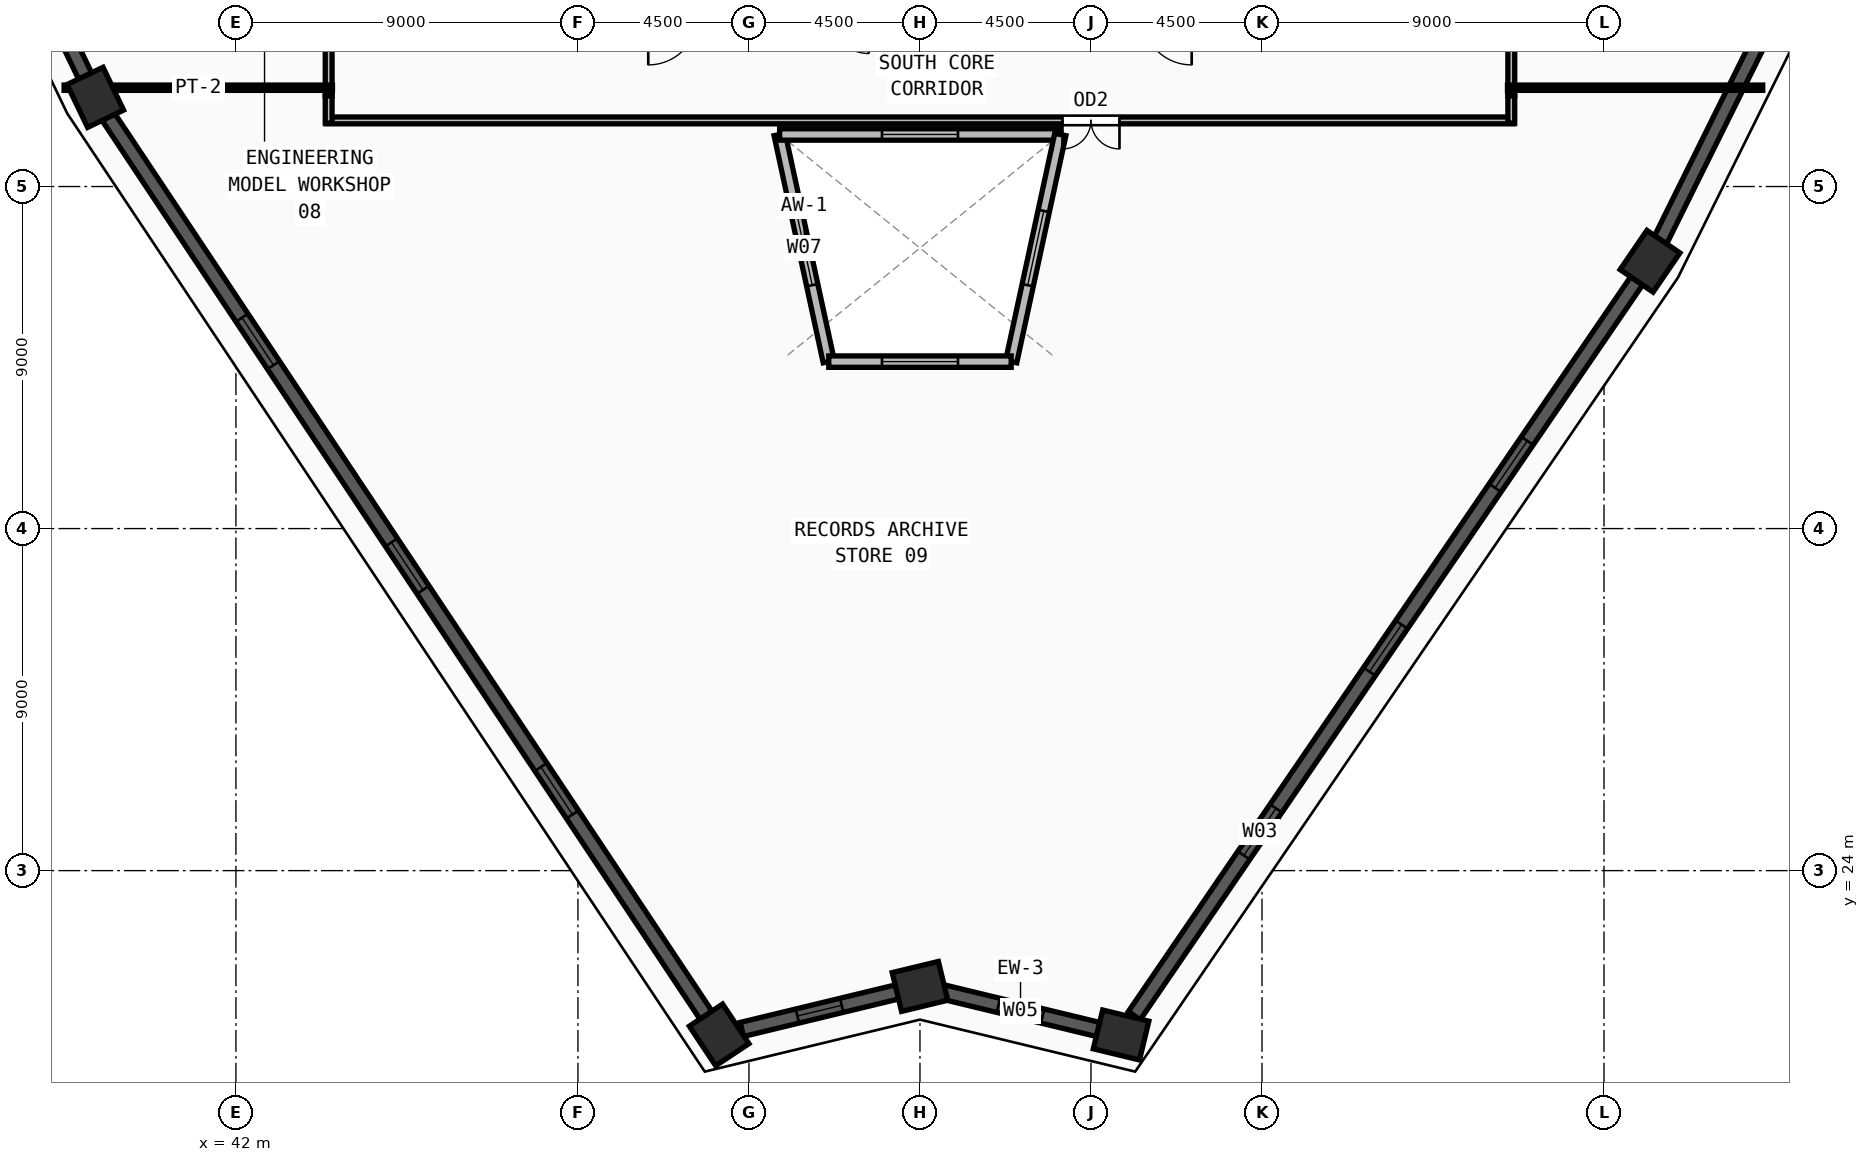
"""IFC4 building model, lengths in metres.
Left out: names, types, materials, properties, quantities, classifications, styles, units other than length and angle.
Written with IfcOpenShell. Run it as: python <this file> out.ifc"""

import sys

from ifc_helpers import new_model, si_unit, direction, frame, frame_2d, origin, origin_2d, place, context, subcontext, project, spatial, rectangle, extrude, source, transform, mapped, element, fill, save


model = new_model("IFC4")
c1 = context("Model", 3, precision=1e-05, world=origin(), true_north=direction((0.0, 1.0)))
c2 = subcontext(c1, "Body", "Model", "MODEL_VIEW")
j1 = project(units=[si_unit("LENGTHUNIT", "METRE"), si_unit("PLANEANGLEUNIT", "RADIAN")], contexts=[c1])
p1 = place(None, origin())
s1 = spatial("IfcSite", under=j1, at=p1, CompositionType="ELEMENT")
p2 = place(p1, origin())
s2 = spatial("IfcBuilding", under=s1, at=p2, CompositionType="ELEMENT")
p3 = place(p2, frame((0.0, 0.0, 236.25)))
s3 = spatial("IfcBuildingStorey", under=s2, at=p3, CompositionType="ELEMENT", Elevation=236.25)
m1 = source(origin(), c2, "Body", "SweptSolid", [
    extrude(rectangle(XDim=1.25, YDim=1.05, at=origin_2d()), origin(), (0.0, 0.0, 1.0), 3.75),
])
for number, where, z_axis, x_axis in (
    (1, (54.715, 19.677, 0.0), (0.0, 0.0, 1.0), (-0.554, 0.833, 0.0)),
    (2, (38.3, 44.347, 0.0), (0.0, 0.0, 1.0), (-0.433, 0.902, 0.0)),
    (3, (79.21, 40.034, 0.0), (0.0, 0.0, 1.0), (0.564, 0.826, 0.0)),
    (4, (65.292, 19.675, 0.0), (0.0, 0.0, 1.0), (-0.972, 0.235, 0.0)),
    (5, (60.0, 20.953, 0.0), (0.0, 0.0, 1.0), (0.972, 0.235, 0.0)),
):
    element("IfcColumn", number, at=place(p3, frame(where, z_axis=z_axis, x_axis=x_axis)), inside=s3, PredefinedType="COLUMN", context=c2, shape_type="MappedRepresentation", body=[
        mapped(m1, transform((0.0, 0.0, 0.0), x_axis=(1.0, 0.0, 0.0), y_axis=(0.0, 1.0, 0.0), z_axis=(0.0, 0.0, 1.0), scale=1.0)),
    ])
p4 = place(p3, frame((60.598, 20.809, 0.0), z_axis=(0.0, 0.0, 1.0), x_axis=(0.972014274606, -0.234921795418, 0.0)))
e6 = element("IfcWall", 6, at=p4, inside=s3, PredefinedType="SOLIDWALL", context=c2, shape_type="SweptSolid", body=[
    extrude(rectangle(XDim=4.214, YDim=0.38, at=frame_2d((2.107, 0.0))), origin(), (0.0, 0.0, 1.0), 3.57),
])
m2 = source(origin(), c2, "Body", "SweptSolid", [
    extrude(rectangle(XDim=1.2, YDim=1.9, at=frame_2d((0.6, 0.95))), frame((0.0, 0.2, 0.0), z_axis=(0.0, -1.0, 0.0), x_axis=(1.0, 0.0, 0.0)), (0.0, 0.0, 1.0), 0.4),
])
p5 = place(p4, frame((1.507, 0.0, 0.55)))
e7 = element("IfcOpeningElement", 7, at=p5, cuts=e6, PredefinedType="OPENING", context=c2, shape_type="MappedRepresentation", body=[
    mapped(m2, transform((0.0, 0.0, 0.0), x_axis=(1.0, 0.0, 0.0), y_axis=(0.0, 1.0, 0.0), z_axis=(0.0, 0.0, 1.0), scale=1.0)),
])
p6 = place(p3, frame((65.639, 20.183, 0.0), z_axis=(0.0, 0.0, 1.0), x_axis=(0.564381319664, 0.825514219147, 0.0)))
e8 = element("IfcWall", 8, at=p6, inside=s3, PredefinedType="SOLIDWALL", context=c2, shape_type="SweptSolid", body=[
    extrude(rectangle(XDim=23.431, YDim=0.38, at=frame_2d((11.716, 0.0))), origin(), (0.0, 0.0, 1.0), 3.57),
])
m3 = source(origin(), c2, "Body", "SweptSolid", [
    extrude(rectangle(XDim=1.5, YDim=1.9, at=frame_2d((0.75, 0.95))), frame((0.0, 0.2, 0.0), z_axis=(0.0, -1.0, 0.0), x_axis=(1.0, 0.0, 0.0)), (0.0, 0.0, 1.0), 0.4),
])
p7 = place(p6, frame((5.108, 0.0, 0.55)))
e9 = element("IfcOpeningElement", 9, at=p7, cuts=e8, PredefinedType="OPENING", context=c2, shape_type="MappedRepresentation", body=[
    mapped(m3, transform((0.0, 0.0, 0.0), x_axis=(1.0, 0.0, 0.0), y_axis=(0.0, 1.0, 0.0), z_axis=(0.0, 0.0, 1.0), scale=1.0)),
])
p8 = place(p6, frame((10.966, 0.0, 0.55)))
e10 = element("IfcOpeningElement", 10, at=p8, cuts=e8, PredefinedType="OPENING", context=c2, shape_type="MappedRepresentation", body=[
    mapped(m3, transform((0.0, 0.0, 0.0), x_axis=(1.0, 0.0, 0.0), y_axis=(0.0, 1.0, 0.0), z_axis=(0.0, 0.0, 1.0), scale=1.0)),
])
p9 = place(p6, frame((16.823, 0.0, 0.55)))
e11 = element("IfcOpeningElement", 11, at=p9, cuts=e8, PredefinedType="OPENING", context=c2, shape_type="MappedRepresentation", body=[
    mapped(m3, transform((0.0, 0.0, 0.0), x_axis=(1.0, 0.0, 0.0), y_axis=(0.0, 1.0, 0.0), z_axis=(0.0, 0.0, 1.0), scale=1.0)),
])
p10 = place(p3, frame((79.483, 40.585, 0.0), z_axis=(0.0, 0.0, 1.0), x_axis=(0.444016540866, 0.896018588779, 0.0)))
e12 = element("IfcWall", 12, at=p10, inside=s3, PredefinedType="SOLIDWALL", context=c2, shape_type="SweptSolid", body=[
    extrude(rectangle(XDim=28.402, YDim=0.38, at=frame_2d((14.201, 0.0))), origin(), (0.0, 0.0, 1.0), 3.57),
])
p11 = place(p10, frame((6.351, 0.0, 0.55)))
e13 = element("IfcOpeningElement", 13, at=p11, cuts=e12, PredefinedType="OPENING", context=c2, shape_type="MappedRepresentation", body=[
    mapped(m3, transform((0.0, 0.0, 0.0), x_axis=(1.0, 0.0, 0.0), y_axis=(0.0, 1.0, 0.0), z_axis=(0.0, 0.0, 1.0), scale=1.0)),
])
p12 = place(p10, frame((13.451, 0.0, 0.55)))
e14 = element("IfcOpeningElement", 14, at=p12, cuts=e12, PredefinedType="OPENING", context=c2, shape_type="MappedRepresentation", body=[
    mapped(m3, transform((0.0, 0.0, 0.0), x_axis=(1.0, 0.0, 0.0), y_axis=(0.0, 1.0, 0.0), z_axis=(0.0, 0.0, 1.0), scale=1.0)),
])
p13 = place(p10, frame((19.702, 0.0, 0.55)))
e15 = element("IfcOpeningElement", 15, at=p13, cuts=e12, PredefinedType="OPENING", context=c2, shape_type="MappedRepresentation", body=[
    mapped(m3, transform((0.0, 0.0, 0.0), x_axis=(1.0, 0.0, 0.0), y_axis=(0.0, 1.0, 0.0), z_axis=(0.0, 0.0, 1.0), scale=1.0)),
])
p14 = place(p3, frame((27.893, 66.025, 0.0), z_axis=(0.0, 0.0, 1.0), x_axis=(0.432777471902, -0.901500781926, 0.0)))
e16 = element("IfcWall", 16, at=p14, inside=s3, PredefinedType="SOLIDWALL", context=c2, shape_type="SweptSolid", body=[
    extrude(rectangle(XDim=23.432, YDim=0.38, at=frame_2d((11.716, 0.0))), origin(), (0.0, 0.0, 1.0), 3.57),
])
p15 = place(p14, frame((5.108, 0.0, 0.55)))
e17 = element("IfcOpeningElement", 17, at=p15, cuts=e16, PredefinedType="OPENING", context=c2, shape_type="MappedRepresentation", body=[
    mapped(m3, transform((0.0, 0.0, 0.0), x_axis=(1.0, 0.0, 0.0), y_axis=(0.0, 1.0, 0.0), z_axis=(0.0, 0.0, 1.0), scale=1.0)),
])
p16 = place(p14, frame((10.966, 0.0, 0.55)))
e18 = element("IfcOpeningElement", 18, at=p16, cuts=e16, PredefinedType="OPENING", context=c2, shape_type="MappedRepresentation", body=[
    mapped(m3, transform((0.0, 0.0, 0.0), x_axis=(1.0, 0.0, 0.0), y_axis=(0.0, 1.0, 0.0), z_axis=(0.0, 0.0, 1.0), scale=1.0)),
])
p17 = place(p3, frame((38.641, 43.835, 0.0), z_axis=(0.0, 0.0, 1.0), x_axis=(0.553942197413, -0.83255512846, 0.0)))
e19 = element("IfcWall", 19, at=p17, inside=s3, PredefinedType="SOLIDWALL", context=c2, shape_type="SweptSolid", body=[
    extrude(rectangle(XDim=28.402, YDim=0.38, at=frame_2d((14.201, 0.0))), origin(), (0.0, 0.0, 1.0), 3.57),
])
p18 = place(p17, frame((6.35, 0.0, 0.55)))
e20 = element("IfcOpeningElement", 20, at=p18, cuts=e19, PredefinedType="OPENING", context=c2, shape_type="MappedRepresentation", body=[
    mapped(m3, transform((0.0, 0.0, 0.0), x_axis=(1.0, 0.0, 0.0), y_axis=(0.0, 1.0, 0.0), z_axis=(0.0, 0.0, 1.0), scale=1.0)),
])
p19 = place(p17, frame((13.451, 0.0, 0.55)))
e21 = element("IfcOpeningElement", 21, at=p19, cuts=e19, PredefinedType="OPENING", context=c2, shape_type="MappedRepresentation", body=[
    mapped(m3, transform((0.0, 0.0, 0.0), x_axis=(1.0, 0.0, 0.0), y_axis=(0.0, 1.0, 0.0), z_axis=(0.0, 0.0, 1.0), scale=1.0)),
])
p20 = place(p17, frame((20.551, 0.0, 0.55)))
e22 = element("IfcOpeningElement", 22, at=p20, cuts=e19, PredefinedType="OPENING", context=c2, shape_type="MappedRepresentation", body=[
    mapped(m3, transform((0.0, 0.0, 0.0), x_axis=(1.0, 0.0, 0.0), y_axis=(0.0, 1.0, 0.0), z_axis=(0.0, 0.0, 1.0), scale=1.0)),
])
p21 = place(p3, frame((55.313, 19.821, 0.0), z_axis=(0.0, 0.0, 1.0), x_axis=(0.972027407526, 0.234867449893, 0.0)))
e23 = element("IfcWall", 23, at=p21, inside=s3, PredefinedType="SOLIDWALL", context=c2, shape_type="SweptSolid", body=[
    extrude(rectangle(XDim=4.207, YDim=0.38, at=frame_2d((2.104, 0.0))), origin(), (0.0, 0.0, 1.0), 3.57),
])
p22 = place(p21, frame((1.503, 0.0, 0.55)))
e24 = element("IfcOpeningElement", 24, at=p22, cuts=e23, PredefinedType="OPENING", context=c2, shape_type="MappedRepresentation", body=[
    mapped(m2, transform((0.0, 0.0, 0.0), x_axis=(1.0, 0.0, 0.0), y_axis=(0.0, 1.0, 0.0), z_axis=(0.0, 0.0, 1.0), scale=1.0)),
])
p23 = place(p3, frame((57.6, 37.393, 0.0), z_axis=(0.0, 0.0, 1.0), x_axis=(-0.211469886749, 0.977384513382, 0.0)))
e25 = element("IfcWall", 25, at=p23, inside=s3, PredefinedType="SOLIDWALL", context=c2, shape_type="SweptSolid", body=[
    extrude(rectangle(XDim=6.115, YDim=0.3, at=frame_2d((3.058, 0.0))), origin(), (0.0, 0.0, 1.0), 3.57),
])
m4 = source(origin(), c2, "Body", "SweptSolid", [
    extrude(rectangle(XDim=2.0, YDim=1.9, at=frame_2d((1.0, 0.95))), frame((0.0, 0.16, 0.0), z_axis=(0.0, -1.0, 0.0), x_axis=(1.0, 0.0, 0.0)), (0.0, 0.0, 1.0), 0.32),
])
p24 = place(p23, frame((2.058, 0.0, 0.55)))
e26 = element("IfcOpeningElement", 26, at=p24, cuts=e25, PredefinedType="OPENING", context=c2, shape_type="MappedRepresentation", body=[
    mapped(m4, transform((0.0, 0.0, 0.0), x_axis=(1.0, 0.0, 0.0), y_axis=(0.0, 1.0, 0.0), z_axis=(0.0, 0.0, 1.0), scale=1.0)),
])
p25 = place(p3, frame((56.307, 43.37, 0.0), z_axis=(0.0, 0.0, 1.0), x_axis=(1.0, 0.0, 0.0)))
e27 = element("IfcWall", 27, at=p25, inside=s3, PredefinedType="SOLIDWALL", context=c2, shape_type="SweptSolid", body=[
    extrude(rectangle(XDim=7.386, YDim=0.3, at=frame_2d((3.693, 0.0))), origin(), (0.0, 0.0, 1.0), 3.57),
])
p26 = place(p25, frame((2.693, 0.0, 0.55)))
e28 = element("IfcOpeningElement", 28, at=p26, cuts=e27, PredefinedType="OPENING", context=c2, shape_type="MappedRepresentation", body=[
    mapped(m4, transform((0.0, 0.0, 0.0), x_axis=(1.0, 0.0, 0.0), y_axis=(0.0, 1.0, 0.0), z_axis=(0.0, 0.0, 1.0), scale=1.0)),
])
p27 = place(p3, frame((63.693, 43.37, 0.0), z_axis=(0.0, 0.0, 1.0), x_axis=(-0.211469886749, -0.977384513382, 0.0)))
e29 = element("IfcWall", 29, at=p27, inside=s3, PredefinedType="SOLIDWALL", context=c2, shape_type="SweptSolid", body=[
    extrude(rectangle(XDim=6.115, YDim=0.3, at=frame_2d((3.058, 0.0))), origin(), (0.0, 0.0, 1.0), 3.57),
])
p28 = place(p27, frame((2.058, 0.0, 0.55)))
e30 = element("IfcOpeningElement", 30, at=p28, cuts=e29, PredefinedType="OPENING", context=c2, shape_type="MappedRepresentation", body=[
    mapped(m4, transform((0.0, 0.0, 0.0), x_axis=(1.0, 0.0, 0.0), y_axis=(0.0, 1.0, 0.0), z_axis=(0.0, 0.0, 1.0), scale=1.0)),
])
p29 = place(p3, frame((62.4, 37.393, 0.0), z_axis=(0.0, 0.0, 1.0), x_axis=(-1.0, 0.0, 0.0)))
e31 = element("IfcWall", 31, at=p29, inside=s3, PredefinedType="SOLIDWALL", context=c2, shape_type="SweptSolid", body=[
    extrude(rectangle(XDim=4.8, YDim=0.3, at=frame_2d((2.4, 0.0))), origin(), (0.0, 0.0, 1.0), 3.57),
])
p30 = place(p29, frame((1.4, 0.0, 0.55)))
e32 = element("IfcOpeningElement", 32, at=p30, cuts=e31, PredefinedType="OPENING", context=c2, shape_type="MappedRepresentation", body=[
    mapped(m4, transform((0.0, 0.0, 0.0), x_axis=(1.0, 0.0, 0.0), y_axis=(0.0, 1.0, 0.0), z_axis=(0.0, 0.0, 1.0), scale=1.0)),
])
p31 = place(p3, frame((75.63, 43.74, 0.0), z_axis=(0.0, 0.0, 1.0), x_axis=(-1.0, 0.0, 0.0)))
e33 = element("IfcWall", 33, at=p31, inside=s3, PredefinedType="PARTITIONING", context=c2, shape_type="SweptSolid", body=[
    extrude(rectangle(XDim=31.26, YDim=0.18, at=frame_2d((15.63, 0.0))), origin(), (0.0, 0.0, 1.0), 3.57),
])
m5 = source(origin(), c2, "Body", "SweptSolid", [
    extrude(rectangle(XDim=1.5, YDim=2.2, at=frame_2d((0.75, 1.1))), frame((0.0, 0.1, 0.0), z_axis=(0.0, -1.0, 0.0), x_axis=(1.0, 0.0, 0.0)), (0.0, 0.0, 1.0), 0.2),
])
p32 = place(p31, frame((10.38, 0.0, 0.0)))
e34 = element("IfcOpeningElement", 34, at=p32, cuts=e33, PredefinedType="OPENING", context=c2, shape_type="MappedRepresentation", body=[
    mapped(m5, transform((0.0, 0.0, 0.0), x_axis=(1.0, 0.0, 0.0), y_axis=(0.0, 1.0, 0.0), z_axis=(0.0, 0.0, 1.0), scale=1.0)),
])
p33 = place(p3, frame((75.56, 48.285, 0.0), z_axis=(0.0, 0.0, 1.0), x_axis=(0.0, -1.0, 0.0)))
e35 = element("IfcWall", 35, at=p33, inside=s3, PredefinedType="PARTITIONING", context=c2, shape_type="SweptSolid", body=[
    extrude(rectangle(XDim=3.9, YDim=0.18, at=frame_2d((1.95, 0.0))), origin(), (0.0, 0.0, 1.0), 3.57),
])
m6 = source(origin(), c2, "Body", "SweptSolid", [
    extrude(rectangle(XDim=1.0, YDim=2.2, at=frame_2d((0.5, 1.1))), frame((0.0, 0.1, 0.0), z_axis=(0.0, -1.0, 0.0), x_axis=(1.0, 0.0, 0.0)), (0.0, 0.0, 1.0), 0.2),
])
p34 = place(p33, frame((1.45, 0.0, 0.0)))
e36 = element("IfcOpeningElement", 36, at=p34, cuts=e35, PredefinedType="OPENING", context=c2, shape_type="MappedRepresentation", body=[
    mapped(m6, transform((0.0, 0.0, 0.0), x_axis=(1.0, 0.0, 0.0), y_axis=(0.0, 1.0, 0.0), z_axis=(0.0, 0.0, 1.0), scale=1.0)),
])
p35 = place(p3, frame((44.44, 44.385, 0.0), z_axis=(0.0, 0.0, 1.0), x_axis=(0.0, 1.0, 0.0)))
e37 = element("IfcWall", 37, at=p35, inside=s3, PredefinedType="PARTITIONING", context=c2, shape_type="SweptSolid", body=[
    extrude(rectangle(XDim=3.825, YDim=0.18, at=frame_2d((1.913, 0.0))), origin(), (0.0, 0.0, 1.0), 3.57),
])
for number, where, z_axis, x_axis in (
    (38, (44.44, 43.67, 0.0), (0.0, 0.0, 1.0), (0.0, 1.0, 0.0)),
    (39, (75.56, 44.385, 0.0), (0.0, 0.0, 1.0), (0.0, -1.0, 0.0)),
):
    element("IfcWall", number, at=place(p3, frame(where, z_axis=z_axis, x_axis=x_axis)), inside=s3, PredefinedType="PARTITIONING", context=c2, shape_type="SweptSolid", body=[
        extrude(rectangle(XDim=0.715, YDim=0.18, at=frame_2d((0.357, 0.0))), origin(), (0.0, 0.0, 1.0), 3.57),
    ])
p36 = place(p3, frame((44.54, 44.6, 0.0), z_axis=(0.0, 0.0, 1.0), x_axis=(-1.0, 0.0, 0.0)))
e40 = element("IfcWall", 40, at=p36, inside=s3, PredefinedType="PARTITIONING", context=c2, shape_type="SweptSolid", body=[
    extrude(rectangle(XDim=7.061, YDim=0.14, at=frame_2d((3.531, 0.0))), origin(), (0.0, 0.0, 1.0), 3.57),
])
p37 = place(p3, frame((75.46, 44.6, 0.0), z_axis=(0.0, 0.0, 1.0), x_axis=(1.0, 0.0, 0.0)))
e41 = element("IfcWall", 41, at=p37, inside=s3, PredefinedType="PARTITIONING", context=c2, shape_type="SweptSolid", body=[
    extrude(rectangle(XDim=6.716, YDim=0.14, at=frame_2d((3.358, 0.0))), origin(), (0.0, 0.0, 1.0), 3.57),
])
m7 = source(origin(), c2, "Body", "SweptSolid", [
    extrude(rectangle(XDim=1.2, YDim=1.9, at=frame_2d((0.6, 0.95))), frame((0.0, 0.03, 0.0), z_axis=(0.0, -1.0, 0.0), x_axis=(1.0, 0.0, 0.0)), (0.0, 0.0, 1.0), 0.06),
])
p38 = place(p5, origin())
e42 = element("IfcWindow", 42, at=p38, inside=s3, PartitioningType="SINGLE_PANEL", PredefinedType="WINDOW", context=c2, shape_type="MappedRepresentation", body=[
    mapped(m7, transform((0.0, 0.0, 0.0), x_axis=(1.0, 0.0, 0.0), y_axis=(0.0, 1.0, 0.0), z_axis=(0.0, 0.0, 1.0), scale=1.0)),
])
fill(e7, e42)
m8 = source(origin(), c2, "Body", "SweptSolid", [
    extrude(rectangle(XDim=1.5, YDim=1.9, at=frame_2d((0.75, 0.95))), frame((0.0, 0.03, 0.0), z_axis=(0.0, -1.0, 0.0), x_axis=(1.0, 0.0, 0.0)), (0.0, 0.0, 1.0), 0.06),
])
p39 = place(p7, origin())
e43 = element("IfcWindow", 43, at=p39, inside=s3, PartitioningType="DOUBLE_PANEL_VERTICAL", PredefinedType="WINDOW", context=c2, shape_type="MappedRepresentation", body=[
    mapped(m8, transform((0.0, 0.0, 0.0), x_axis=(1.0, 0.0, 0.0), y_axis=(0.0, 1.0, 0.0), z_axis=(0.0, 0.0, 1.0), scale=1.0)),
])
fill(e9, e43)
p40 = place(p8, origin())
e44 = element("IfcWindow", 44, at=p40, inside=s3, PartitioningType="DOUBLE_PANEL_VERTICAL", PredefinedType="WINDOW", context=c2, shape_type="MappedRepresentation", body=[
    mapped(m8, transform((0.0, 0.0, 0.0), x_axis=(1.0, 0.0, 0.0), y_axis=(0.0, 1.0, 0.0), z_axis=(0.0, 0.0, 1.0), scale=1.0)),
])
fill(e10, e44)
p41 = place(p9, origin())
e45 = element("IfcWindow", 45, at=p41, inside=s3, PartitioningType="DOUBLE_PANEL_VERTICAL", PredefinedType="WINDOW", context=c2, shape_type="MappedRepresentation", body=[
    mapped(m8, transform((0.0, 0.0, 0.0), x_axis=(1.0, 0.0, 0.0), y_axis=(0.0, 1.0, 0.0), z_axis=(0.0, 0.0, 1.0), scale=1.0)),
])
fill(e11, e45)
p42 = place(p18, origin())
e46 = element("IfcWindow", 46, at=p42, inside=s3, PartitioningType="DOUBLE_PANEL_VERTICAL", PredefinedType="WINDOW", context=c2, shape_type="MappedRepresentation", body=[
    mapped(m8, transform((0.0, 0.0, 0.0), x_axis=(1.0, 0.0, 0.0), y_axis=(0.0, 1.0, 0.0), z_axis=(0.0, 0.0, 1.0), scale=1.0)),
])
fill(e20, e46)
p43 = place(p19, origin())
e47 = element("IfcWindow", 47, at=p43, inside=s3, PartitioningType="DOUBLE_PANEL_VERTICAL", PredefinedType="WINDOW", context=c2, shape_type="MappedRepresentation", body=[
    mapped(m8, transform((0.0, 0.0, 0.0), x_axis=(1.0, 0.0, 0.0), y_axis=(0.0, 1.0, 0.0), z_axis=(0.0, 0.0, 1.0), scale=1.0)),
])
fill(e21, e47)
p44 = place(p20, origin())
e48 = element("IfcWindow", 48, at=p44, inside=s3, PartitioningType="DOUBLE_PANEL_VERTICAL", PredefinedType="WINDOW", context=c2, shape_type="MappedRepresentation", body=[
    mapped(m8, transform((0.0, 0.0, 0.0), x_axis=(1.0, 0.0, 0.0), y_axis=(0.0, 1.0, 0.0), z_axis=(0.0, 0.0, 1.0), scale=1.0)),
])
fill(e22, e48)
p45 = place(p22, origin())
e49 = element("IfcWindow", 49, at=p45, inside=s3, PartitioningType="SINGLE_PANEL", PredefinedType="WINDOW", context=c2, shape_type="MappedRepresentation", body=[
    mapped(m7, transform((0.0, 0.0, 0.0), x_axis=(1.0, 0.0, 0.0), y_axis=(0.0, 1.0, 0.0), z_axis=(0.0, 0.0, 1.0), scale=1.0)),
])
fill(e24, e49)
m9 = source(origin(), c2, "Body", "SweptSolid", [
    extrude(rectangle(XDim=2.0, YDim=1.9, at=frame_2d((1.0, 0.95))), frame((0.0, 0.03, 0.0), z_axis=(0.0, -1.0, 0.0), x_axis=(1.0, 0.0, 0.0)), (0.0, 0.0, 1.0), 0.06),
])
p46 = place(p24, origin())
e50 = element("IfcWindow", 50, at=p46, inside=s3, PartitioningType="DOUBLE_PANEL_VERTICAL", PredefinedType="WINDOW", context=c2, shape_type="MappedRepresentation", body=[
    mapped(m9, transform((0.0, 0.0, 0.0), x_axis=(1.0, 0.0, 0.0), y_axis=(0.0, 1.0, 0.0), z_axis=(0.0, 0.0, 1.0), scale=1.0)),
])
fill(e26, e50)
p47 = place(p26, origin())
e51 = element("IfcWindow", 51, at=p47, inside=s3, PartitioningType="DOUBLE_PANEL_VERTICAL", PredefinedType="WINDOW", context=c2, shape_type="MappedRepresentation", body=[
    mapped(m9, transform((0.0, 0.0, 0.0), x_axis=(1.0, 0.0, 0.0), y_axis=(0.0, 1.0, 0.0), z_axis=(0.0, 0.0, 1.0), scale=1.0)),
])
fill(e28, e51)
p48 = place(p28, origin())
e52 = element("IfcWindow", 52, at=p48, inside=s3, PartitioningType="DOUBLE_PANEL_VERTICAL", PredefinedType="WINDOW", context=c2, shape_type="MappedRepresentation", body=[
    mapped(m9, transform((0.0, 0.0, 0.0), x_axis=(1.0, 0.0, 0.0), y_axis=(0.0, 1.0, 0.0), z_axis=(0.0, 0.0, 1.0), scale=1.0)),
])
fill(e30, e52)
p49 = place(p30, origin())
e53 = element("IfcWindow", 53, at=p49, inside=s3, PartitioningType="DOUBLE_PANEL_VERTICAL", PredefinedType="WINDOW", context=c2, shape_type="MappedRepresentation", body=[
    mapped(m9, transform((0.0, 0.0, 0.0), x_axis=(1.0, 0.0, 0.0), y_axis=(0.0, 1.0, 0.0), z_axis=(0.0, 0.0, 1.0), scale=1.0)),
])
fill(e32, e53)
m10 = source(origin(), c2, "Body", "SweptSolid", [
    extrude(rectangle(XDim=1.5, YDim=2.2, at=frame_2d((0.75, 1.1))), frame((0.0, 0.025, 0.0), z_axis=(0.0, -1.0, 0.0), x_axis=(1.0, 0.0, 0.0)), (0.0, 0.0, 1.0), 0.05),
])
p50 = place(p32, origin())
e54 = element("IfcDoor", 54, at=p50, inside=s3, OperationType="DOUBLE_DOOR_SINGLE_SWING", PredefinedType="DOOR", context=c2, shape_type="MappedRepresentation", body=[
    mapped(m10, transform((0.0, 0.0, 0.0), x_axis=(1.0, 0.0, 0.0), y_axis=(0.0, 1.0, 0.0), z_axis=(0.0, 0.0, 1.0), scale=1.0)),
])
fill(e34, e54)
save(model, sys.argv[1])
